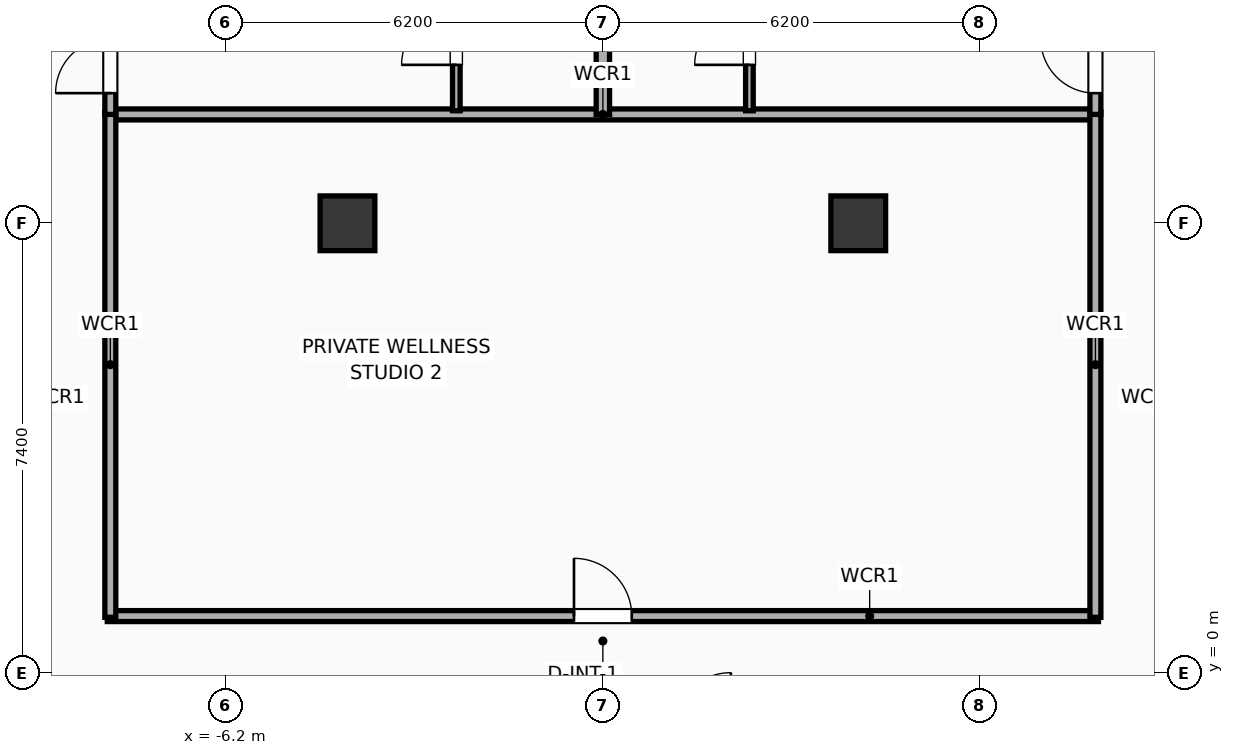
"""IFC4 building model, lengths in metres.
Left out: names, types, materials, properties, quantities, classifications, styles, units other than length and angle.
Written with IfcOpenShell. Run it as: python <this file> out.ifc"""

import sys

from ifc_helpers import new_model, si_unit, direction, frame, frame_2d, origin, origin_2d, place, context, subcontext, project, spatial, rectangle, extrude, element, fill, save


model = new_model("IFC4")
c1 = context("Model", 3, precision=1e-05, world=origin(), true_north=direction((0.0, 1.0)))
c2 = subcontext(c1, "Body", "Model", "MODEL_VIEW")
j1 = project(units=[si_unit("LENGTHUNIT", "METRE"), si_unit("PLANEANGLEUNIT", "RADIAN")], contexts=[c1])
p1 = place(None, origin())
s1 = spatial("IfcSite", under=j1, at=p1, CompositionType="ELEMENT")
p2 = place(p1, origin())
s2 = spatial("IfcBuilding", under=s1, at=p2, CompositionType="ELEMENT")
p3 = place(p2, frame((0.0, 0.0, 148.2)))
s3 = spatial("IfcBuildingStorey", under=s2, at=p3, CompositionType="ELEMENT", Elevation=148.2)
for number, where, z_axis, x_axis in (
    (1, (-4.2, 7.4, 0.0), (0.0, 0.0, 1.0), (1.0, 0.0, 0.0)),
    (2, (4.2, 7.4, 0.0), (0.0, 0.0, 1.0), (1.0, 0.0, 0.0)),
):
    element("IfcColumn", number, at=place(p3, frame(where, z_axis=z_axis, x_axis=x_axis)), inside=s3, PredefinedType="COLUMN", context=c2, shape_type="SweptSolid", body=[
        extrude(rectangle(XDim=0.9, YDim=0.9, at=origin_2d()), origin(), (0.0, 0.0, 1.0), 3.9),
    ])
p4 = place(p3, frame((-8.15, 9.19, 0.0), z_axis=(0.0, 0.0, 1.0), x_axis=(1.0, 0.0, 0.0)))
e3 = element("IfcWall", 3, at=p4, inside=s3, PredefinedType="PARTITIONING", context=c2, shape_type="SweptSolid", body=[
    extrude(rectangle(XDim=16.3, YDim=0.18, at=frame_2d((8.15, 0.0))), origin(), (0.0, 0.0, 1.0), 3.65),
])
p5 = place(p3, frame((-8.15, 0.94, 0.0), z_axis=(0.0, 0.0, 1.0), x_axis=(1.0, 0.0, 0.0)))
e4 = element("IfcWall", 4, at=p5, inside=s3, PredefinedType="PARTITIONING", context=c2, shape_type="SweptSolid", body=[
    extrude(rectangle(XDim=16.3, YDim=0.18, at=frame_2d((8.15, 0.0))), origin(), (0.0, 0.0, 1.0), 3.65),
])
p6 = place(p5, frame((7.675, 0.0, 0.0)))
e5 = element("IfcOpeningElement", 5, at=p6, cuts=e4, PredefinedType="OPENING", context=c2, shape_type="SweptSolid", body=[
    extrude(rectangle(XDim=0.95, YDim=2.05, at=frame_2d((0.475, 1.025))), frame((0.0, 0.1, 0.0), z_axis=(0.0, -1.0, 0.0), x_axis=(1.0, 0.0, 0.0)), (0.0, 0.0, 1.0), 0.2),
])
for number, where, z_axis, x_axis in (
    (6, (-8.1, 0.92, 0.0), (0.0, 0.0, 1.0), (0.0, 1.0, 0.0)),
    (7, (8.1, 0.92, 0.0), (0.0, 0.0, 1.0), (0.0, 1.0, 0.0)),
):
    element("IfcWall", number, at=place(p3, frame(where, z_axis=z_axis, x_axis=x_axis)), inside=s3, PredefinedType="PARTITIONING", context=c2, shape_type="SweptSolid", body=[
        extrude(rectangle(XDim=8.31, YDim=0.18, at=frame_2d((4.155, 0.0))), origin(), (0.0, 0.0, 1.0), 3.65),
    ])
p7 = place(p3, frame((-2.41, 9.25, 0.0), z_axis=(0.0, 0.0, 1.0), x_axis=(0.0, 1.0, 0.0)))
e8 = element("IfcWall", 8, at=p7, inside=s3, PredefinedType="PARTITIONING", context=c2, shape_type="SweptSolid", body=[
    extrude(rectangle(XDim=2.41, YDim=0.125, at=frame_2d((1.205, 0.0))), origin(), (0.0, 0.0, 1.0), 3.65),
])
p8 = place(p7, frame((0.755, 0.0, 0.0)))
e9 = element("IfcOpeningElement", 9, at=p8, cuts=e8, PredefinedType="OPENING", context=c2, shape_type="SweptSolid", body=[
    extrude(rectangle(XDim=0.9, YDim=2.05, at=frame_2d((0.45, 1.025))), frame((0.0, 0.073, 0.0), z_axis=(0.0, -1.0, 0.0), x_axis=(1.0, 0.0, 0.0)), (0.0, 0.0, 1.0), 0.145),
])
p9 = place(p3, frame((-8.1, 9.19, 0.0), z_axis=(0.0, 0.0, 1.0), x_axis=(0.0, 1.0, 0.0)))
e10 = element("IfcWall", 10, at=p9, inside=s3, PredefinedType="PARTITIONING", context=c2, shape_type="SweptSolid", body=[
    extrude(rectangle(XDim=10.036, YDim=0.18, at=frame_2d((5.018, 0.0))), origin(), (0.0, 0.0, 1.0), 3.65),
])
p10 = place(p9, frame((0.35, 0.0, 0.0)))
e11 = element("IfcOpeningElement", 11, at=p10, cuts=e10, PredefinedType="OPENING", context=c2, shape_type="SweptSolid", body=[
    extrude(rectangle(XDim=0.9, YDim=2.05, at=frame_2d((0.45, 1.025))), frame((0.0, 0.1, 0.0), z_axis=(0.0, -1.0, 0.0), x_axis=(1.0, 0.0, 0.0)), (0.0, 0.0, 1.0), 0.2),
])
p11 = place(p3, frame((2.41, 9.25, 0.0), z_axis=(0.0, 0.0, 1.0), x_axis=(0.0, 1.0, 0.0)))
e12 = element("IfcWall", 12, at=p11, inside=s3, PredefinedType="PARTITIONING", context=c2, shape_type="SweptSolid", body=[
    extrude(rectangle(XDim=2.41, YDim=0.125, at=frame_2d((1.205, 0.0))), origin(), (0.0, 0.0, 1.0), 3.65),
])
p12 = place(p11, frame((0.755, 0.0, 0.0)))
e13 = element("IfcOpeningElement", 13, at=p12, cuts=e12, PredefinedType="OPENING", context=c2, shape_type="SweptSolid", body=[
    extrude(rectangle(XDim=0.9, YDim=2.05, at=frame_2d((0.45, 1.025))), frame((0.0, 0.073, 0.0), z_axis=(0.0, -1.0, 0.0), x_axis=(1.0, 0.0, 0.0)), (0.0, 0.0, 1.0), 0.145),
])
p13 = place(p3, frame((8.1, 9.19, 0.0), z_axis=(0.0, 0.0, 1.0), x_axis=(0.0, 1.0, 0.0)))
e14 = element("IfcWall", 14, at=p13, inside=s3, PredefinedType="PARTITIONING", context=c2, shape_type="SweptSolid", body=[
    extrude(rectangle(XDim=11.739, YDim=0.18, at=frame_2d((5.87, 0.0))), origin(), (0.0, 0.0, 1.0), 3.65),
])
p14 = place(p13, frame((0.349, 0.0, 0.0)))
e15 = element("IfcOpeningElement", 15, at=p14, cuts=e14, PredefinedType="OPENING", context=c2, shape_type="SweptSolid", body=[
    extrude(rectangle(XDim=0.9, YDim=2.05, at=frame_2d((0.45, 1.025))), frame((0.0, 0.1, 0.0), z_axis=(0.0, -1.0, 0.0), x_axis=(1.0, 0.0, 0.0)), (0.0, 0.0, 1.0), 0.2),
])
p15 = place(p3, frame((0.0, 9.19, 0.0), z_axis=(0.0, 0.0, 1.0), x_axis=(0.0, 1.0, 0.0)))
e16 = element("IfcWall", 16, at=p15, inside=s3, PredefinedType="PARTITIONING", context=c2, shape_type="SweptSolid", body=[
    extrude(rectangle(XDim=10.888, YDim=0.22, at=frame_2d((5.444, 0.0))), origin(), (0.0, 0.0, 1.0), 3.04),
])
p16 = place(p6, origin())
e17 = element("IfcDoor", 17, at=p16, inside=s3, OperationType="SINGLE_SWING_LEFT", PredefinedType="DOOR", context=c2, shape_type="SweptSolid", body=[
    extrude(rectangle(XDim=0.95, YDim=2.05, at=frame_2d((0.475, 1.025))), frame((0.0, 0.025, 0.0), z_axis=(0.0, -1.0, 0.0), x_axis=(1.0, 0.0, 0.0)), (0.0, 0.0, 1.0), 0.05),
])
fill(e5, e17)
p17 = place(p8, origin())
e18 = element("IfcDoor", 18, at=p17, inside=s3, OperationType="SINGLE_SWING_LEFT", PredefinedType="DOOR", context=c2, shape_type="SweptSolid", body=[
    extrude(rectangle(XDim=0.9, YDim=2.05, at=frame_2d((0.45, 1.025))), frame((0.0, 0.025, 0.0), z_axis=(0.0, -1.0, 0.0), x_axis=(1.0, 0.0, 0.0)), (0.0, 0.0, 1.0), 0.05),
])
fill(e9, e18)
p18 = place(p10, origin())
e19 = element("IfcDoor", 19, at=p18, inside=s3, OperationType="SINGLE_SWING_LEFT", PredefinedType="DOOR", context=c2, shape_type="SweptSolid", body=[
    extrude(rectangle(XDim=0.9, YDim=2.05, at=frame_2d((0.45, 1.025))), frame((0.0, 0.025, 0.0), z_axis=(0.0, -1.0, 0.0), x_axis=(1.0, 0.0, 0.0)), (0.0, 0.0, 1.0), 0.05),
])
fill(e11, e19)
p19 = place(p12, origin())
e20 = element("IfcDoor", 20, at=p19, inside=s3, OperationType="SINGLE_SWING_LEFT", PredefinedType="DOOR", context=c2, shape_type="SweptSolid", body=[
    extrude(rectangle(XDim=0.9, YDim=2.05, at=frame_2d((0.45, 1.025))), frame((0.0, 0.025, 0.0), z_axis=(0.0, -1.0, 0.0), x_axis=(1.0, 0.0, 0.0)), (0.0, 0.0, 1.0), 0.05),
])
fill(e13, e20)
p20 = place(p14, origin())
e21 = element("IfcDoor", 21, at=p20, inside=s3, OperationType="SINGLE_SWING_RIGHT", PredefinedType="DOOR", context=c2, shape_type="SweptSolid", body=[
    extrude(rectangle(XDim=0.9, YDim=2.05, at=frame_2d((0.45, 1.025))), frame((0.0, 0.025, 0.0), z_axis=(0.0, -1.0, 0.0), x_axis=(1.0, 0.0, 0.0)), (0.0, 0.0, 1.0), 0.05),
])
fill(e15, e21)
save(model, sys.argv[1])
